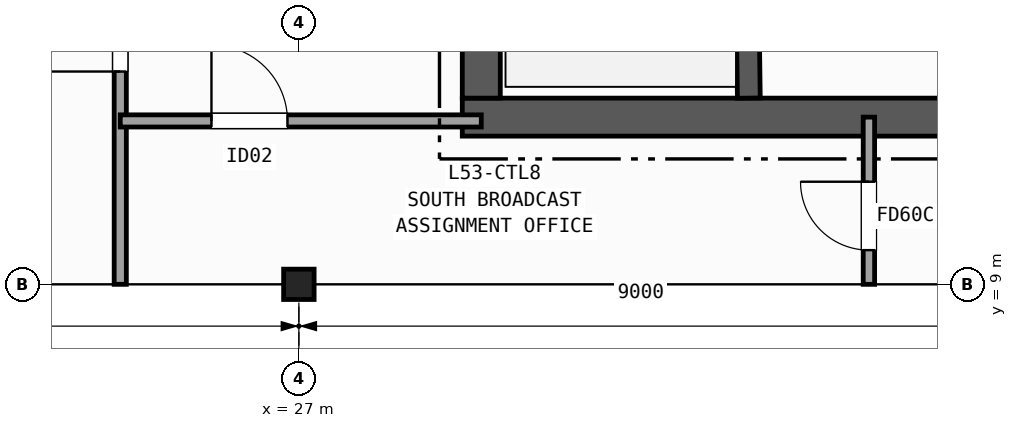
"""IFC4 building model, lengths in metres.
Left out: names, types, materials, properties, quantities, classifications, styles, units other than length and angle.
Written with IfcOpenShell. Run it as: python <this file> out.ifc"""

import sys

from ifc_helpers import new_model, si_unit, direction, frame, frame_2d, origin, origin_2d, place, context, subcontext, project, spatial, rectangle, i_section, extrude, element, fill, save


model = new_model("IFC4")
c1 = context("Model", 3, precision=1e-05, world=origin(), true_north=direction((0.0, 1.0)))
c2 = subcontext(c1, "Body", "Model", "MODEL_VIEW")
j1 = project(units=[si_unit("LENGTHUNIT", "METRE"), si_unit("PLANEANGLEUNIT", "RADIAN")], contexts=[c1])
p1 = place(None, origin())
s1 = spatial("IfcSite", under=j1, at=p1, CompositionType="ELEMENT")
p2 = place(p1, origin())
s2 = spatial("IfcBuilding", under=s1, at=p2, CompositionType="ELEMENT")
p3 = place(p2, frame((0.0, 0.0, 213.6)))
s3 = spatial("IfcBuildingStorey", under=s2, at=p3, CompositionType="ELEMENT", Elevation=213.6)
p4 = place(p3, frame((27.0, 9.0, 0.0), z_axis=(0.0, 0.0, 1.0), x_axis=(1.0, 0.0, 0.0)))
e1 = element("IfcColumn", 1, at=p4, inside=s3, PredefinedType="COLUMN", context=c2, shape_type="SweptSolid", body=[
    extrude(i_section(OverallWidth=0.401, OverallDepth=0.399, WebThickness=0.025, FlangeThickness=0.04, FilletRadius=0.015, at=origin_2d()), origin(), (0.0, 0.0, 1.0), 3.7),
])
p5 = place(p3, frame((29.15, 11.2, 0.0), z_axis=(0.0, 0.0, 1.0), x_axis=(1.0, 0.0, 0.0)))
e2 = element("IfcWall", 2, at=p5, inside=s3, PredefinedType="SHEAR", context=c2, shape_type="SweptSolid", body=[
    extrude(rectangle(XDim=13.9, YDim=0.5, at=frame_2d((6.95, 0.0))), origin(), (0.0, 0.0, 1.0), 3.42),
])
p6 = place(p3, frame((29.4, 24.35, 0.0), z_axis=(0.0, 0.0, 1.0), x_axis=(0.0, -1.0, 0.0)))
e3 = element("IfcWall", 3, at=p6, inside=s3, PredefinedType="SHEAR", context=c2, shape_type="SweptSolid", body=[
    extrude(rectangle(XDim=12.9, YDim=0.5, at=frame_2d((6.45, 0.0))), origin(), (0.0, 0.0, 1.0), 3.42),
])
p7 = place(p6, frame((1.45, 0.0, 0.0)))
e4 = element("IfcOpeningElement", 4, at=p7, cuts=e3, PredefinedType="OPENING", context=c2, shape_type="SweptSolid", body=[
    extrude(rectangle(XDim=1.35, YDim=2.15, at=frame_2d((0.675, 1.075))), frame((0.0, 0.26, 0.0), z_axis=(0.0, -1.0, 0.0), x_axis=(1.0, 0.0, 0.0)), (0.0, 0.0, 1.0), 0.52),
])
p8 = place(p3, frame((32.92, 11.45, 0.0), z_axis=(0.0, 0.0, 1.0), x_axis=(-0.013171578211, 0.999913251001, 0.0)))
e5 = element("IfcWall", 5, at=p8, inside=s3, PredefinedType="SHEAR", context=c2, shape_type="SweptSolid", body=[
    extrude(rectangle(XDim=9.101, YDim=0.3, at=frame_2d((4.55, 0.0))), origin(), (0.0, 0.0, 1.0), 3.42),
])
p9 = place(p3, frame((24.65, 9.0, 0.0), z_axis=(0.0, 0.0, 1.0), x_axis=(0.0, 1.0, 0.0)))
e6 = element("IfcWall", 6, at=p9, inside=s3, PredefinedType="PARTITIONING", context=c2, shape_type="SweptSolid", body=[
    extrude(rectangle(XDim=19.2, YDim=0.16, at=frame_2d((9.6, 0.0))), origin(), (0.0, 0.0, 1.0), 2.707),
])
p10 = place(p9, frame((2.8, 0.0, 0.0)))
e7 = element("IfcOpeningElement", 7, at=p10, cuts=e6, PredefinedType="OPENING", context=c2, shape_type="SweptSolid", body=[
    extrude(rectangle(XDim=1.2, YDim=2.15, at=frame_2d((0.6, 1.075))), frame((0.0, 0.09, 0.0), z_axis=(0.0, -1.0, 0.0), x_axis=(1.0, 0.0, 0.0)), (0.0, 0.0, 1.0), 0.18),
])
p11 = place(p9, frame((8.95, 0.0, 0.0)))
e8 = element("IfcOpeningElement", 8, at=p11, cuts=e6, PredefinedType="OPENING", context=c2, shape_type="SweptSolid", body=[
    extrude(rectangle(XDim=0.86, YDim=2.05, at=frame_2d((0.43, 1.025))), frame((0.0, 0.09, 0.0), z_axis=(0.0, -1.0, 0.0), x_axis=(1.0, 0.0, 0.0)), (0.0, 0.0, 1.0), 0.18),
])
p12 = place(p9, frame((15.215, 0.0, 0.0)))
e9 = element("IfcOpeningElement", 9, at=p12, cuts=e6, PredefinedType="OPENING", context=c2, shape_type="SweptSolid", body=[
    extrude(rectangle(XDim=0.95, YDim=2.1, at=frame_2d((0.475, 1.05))), frame((0.0, 0.09, 0.0), z_axis=(0.0, -1.0, 0.0), x_axis=(1.0, 0.0, 0.0)), (0.0, 0.0, 1.0), 0.18),
])
p13 = place(p3, frame((24.65, 11.15, 0.0), z_axis=(0.0, 0.0, 1.0), x_axis=(1.0, 0.0, 0.0)))
e10 = element("IfcWall", 10, at=p13, inside=s3, PredefinedType="PARTITIONING", context=c2, shape_type="SweptSolid", body=[
    extrude(rectangle(XDim=4.75, YDim=0.16, at=frame_2d((2.375, 0.0))), origin(), (0.0, 0.0, 1.0), 2.792),
])
p14 = place(p13, frame((1.2, 0.0, 0.0)))
e11 = element("IfcOpeningElement", 11, at=p14, cuts=e10, PredefinedType="OPENING", context=c2, shape_type="SweptSolid", body=[
    extrude(rectangle(XDim=1.0, YDim=2.1, at=frame_2d((0.5, 1.05))), frame((0.0, 0.09, 0.0), z_axis=(0.0, -1.0, 0.0), x_axis=(1.0, 0.0, 0.0)), (0.0, 0.0, 1.0), 0.18),
])
p15 = place(p3, frame((34.5, 9.0, 0.0), z_axis=(0.0, 0.0, 1.0), x_axis=(0.0, 1.0, 0.0)))
e12 = element("IfcWall", 12, at=p15, inside=s3, PredefinedType="PARTITIONING", context=c2, shape_type="SweptSolid", body=[
    extrude(rectangle(XDim=2.2, YDim=0.15, at=frame_2d((1.1, 0.0))), origin(), (0.0, 0.0, 1.0), 2.707),
])
p16 = place(p15, frame((0.45, 0.0, 0.0)))
e13 = element("IfcOpeningElement", 13, at=p16, cuts=e12, PredefinedType="OPENING", context=c2, shape_type="SweptSolid", body=[
    extrude(rectangle(XDim=0.9, YDim=2.1, at=frame_2d((0.45, 1.05))), frame((0.0, 0.085, 0.0), z_axis=(0.0, -1.0, 0.0), x_axis=(1.0, 0.0, 0.0)), (0.0, 0.0, 1.0), 0.17),
])
p17 = place(p10, origin())
e14 = element("IfcDoor", 14, at=p17, inside=s3, OperationType="SINGLE_SWING_LEFT", PredefinedType="DOOR", context=c2, shape_type="SweptSolid", body=[
    extrude(rectangle(XDim=1.2, YDim=2.15, at=frame_2d((0.6, 1.075))), frame((0.0, 0.025, 0.0), z_axis=(0.0, -1.0, 0.0), x_axis=(1.0, 0.0, 0.0)), (0.0, 0.0, 1.0), 0.05),
])
fill(e7, e14)
p18 = place(p14, origin())
e15 = element("IfcDoor", 15, at=p18, inside=s3, OperationType="SINGLE_SWING_LEFT", PredefinedType="DOOR", context=c2, shape_type="SweptSolid", body=[
    extrude(rectangle(XDim=1.0, YDim=2.1, at=frame_2d((0.5, 1.05))), frame((0.0, 0.025, 0.0), z_axis=(0.0, -1.0, 0.0), x_axis=(1.0, 0.0, 0.0)), (0.0, 0.0, 1.0), 0.05),
])
fill(e11, e15)
p19 = place(p16, origin())
e16 = element("IfcDoor", 16, at=p19, inside=s3, OperationType="SINGLE_SWING_RIGHT", PredefinedType="DOOR", context=c2, shape_type="SweptSolid", body=[
    extrude(rectangle(XDim=0.9, YDim=2.1, at=frame_2d((0.45, 1.05))), frame((0.0, 0.025, 0.0), z_axis=(0.0, -1.0, 0.0), x_axis=(1.0, 0.0, 0.0)), (0.0, 0.0, 1.0), 0.05),
])
fill(e13, e16)
save(model, sys.argv[1])
